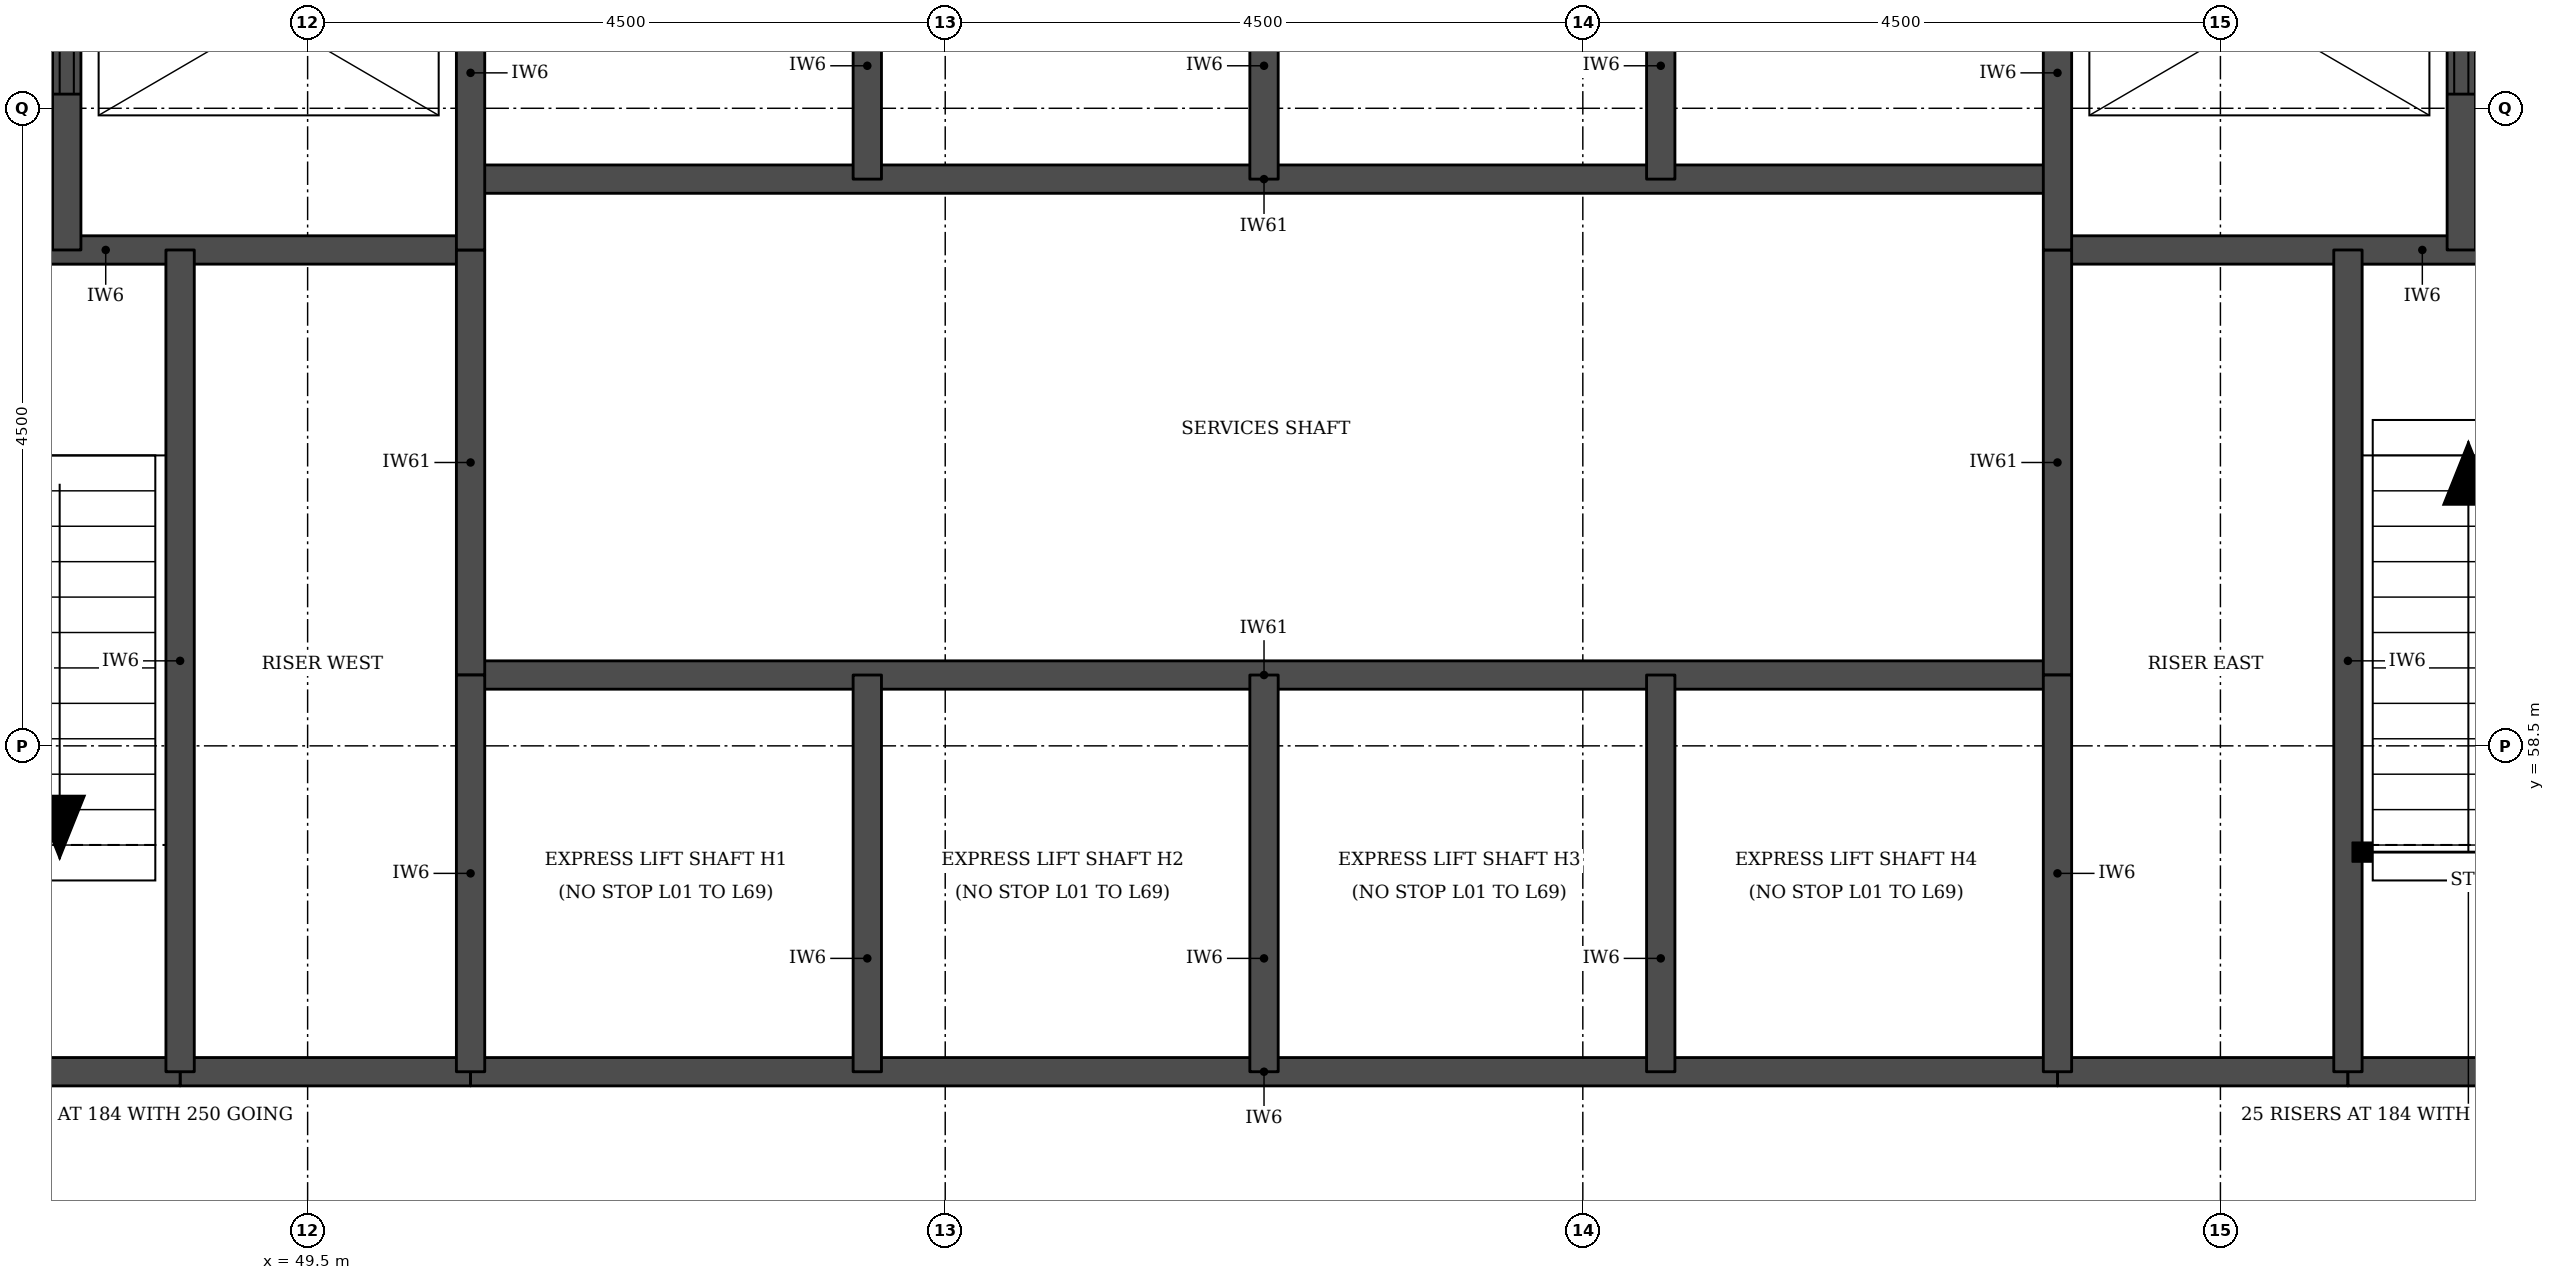
"""IFC4 building model, lengths in metres.
Left out: names, types, materials, properties, quantities, classifications, styles, units other than length and angle.
Written with IfcOpenShell. Run it as: python <this file> out.ifc"""

import sys

from ifc_helpers import new_model, si_unit, direction, frame, frame_2d, origin, place, context, subcontext, project, spatial, rectangle, extrude, element, fill, save


model = new_model("IFC4")
c1 = context("Model", 3, precision=1e-05, world=origin(), true_north=direction((0.0, 1.0)))
c2 = subcontext(c1, "Body", "Model", "MODEL_VIEW")
j1 = project(units=[si_unit("LENGTHUNIT", "METRE"), si_unit("PLANEANGLEUNIT", "RADIAN")], contexts=[c1])
p1 = place(None, origin())
s1 = spatial("IfcSite", under=j1, at=p1, CompositionType="ELEMENT")
p2 = place(p1, origin())
s2 = spatial("IfcBuilding", under=s1, at=p2, CompositionType="ELEMENT")
p3 = place(p2, frame((0.0, 0.0, 18.5)))
s3 = spatial("IfcBuildingStorey", under=s2, at=p3, CompositionType="ELEMENT", Elevation=18.5)
for number, where, z_axis, x_axis in (
    (1, (48.6, 56.2, 0.0), (0.0, 0.0, 1.0), (1.0, 0.0, 0.0)),
    (2, (61.85, 56.2, 0.0), (0.0, 0.0, 1.0), (1.0, 0.0, 0.0)),
):
    element("IfcWall", number, at=place(p3, frame(where, z_axis=z_axis, x_axis=x_axis)), inside=s3, PredefinedType="SOLIDWALL", context=c2, shape_type="SweptSolid", body=[
        extrude(rectangle(XDim=2.05, YDim=0.2, at=frame_2d((1.025, 0.0))), origin(), (0.0, 0.0, 1.0), 4.38),
    ])
p4 = place(p3, frame((45.5, 56.2, 0.0), z_axis=(0.0, 0.0, 1.0), x_axis=(1.0, 0.0, 0.0)))
e3 = element("IfcWall", 3, at=p4, inside=s3, PredefinedType="SOLIDWALL", context=c2, shape_type="SweptSolid", body=[
    extrude(rectangle(XDim=3.1, YDim=0.2, at=frame_2d((1.55, 0.0))), origin(), (0.0, 0.0, 1.0), 4.38),
])
p5 = place(p3, frame((50.65, 56.2, 0.0), z_axis=(0.0, 0.0, 1.0), x_axis=(1.0, 0.0, 0.0)))
e4 = element("IfcWall", 4, at=p5, inside=s3, PredefinedType="SOLIDWALL", context=c2, shape_type="SweptSolid", body=[
    extrude(rectangle(XDim=11.2, YDim=0.2, at=frame_2d((5.6, 0.0))), origin(), (0.0, 0.0, 1.0), 4.38),
])
p6 = place(p3, frame((63.9, 56.2, 0.0), z_axis=(0.0, 0.0, 1.0), x_axis=(1.0, 0.0, 0.0)))
e5 = element("IfcWall", 5, at=p6, inside=s3, PredefinedType="SOLIDWALL", context=c2, shape_type="SweptSolid", body=[
    extrude(rectangle(XDim=3.1, YDim=0.2, at=frame_2d((1.55, 0.0))), origin(), (0.0, 0.0, 1.0), 4.38),
])
p7 = place(p3, frame((50.65, 59.0, 0.0), z_axis=(0.0, 0.0, 1.0), x_axis=(1.0, 0.0, 0.0)))
e6 = element("IfcWall", 6, at=p7, inside=s3, PredefinedType="SOLIDWALL", context=c2, shape_type="SweptSolid", body=[
    extrude(rectangle(XDim=11.2, YDim=0.2, at=frame_2d((5.6, 0.0))), origin(), (0.0, 0.0, 1.0), 4.6),
])
for number, where, z_axis, x_axis in (
    (7, (45.5, 62.0, 0.0), (0.0, 0.0, 1.0), (1.0, 0.0, 0.0)),
    (8, (61.85, 62.0, 0.0), (0.0, 0.0, 1.0), (1.0, 0.0, 0.0)),
):
    element("IfcWall", number, at=place(p3, frame(where, z_axis=z_axis, x_axis=x_axis)), inside=s3, PredefinedType="SOLIDWALL", context=c2, shape_type="SweptSolid", body=[
        extrude(rectangle(XDim=5.15, YDim=0.2, at=frame_2d((2.575, 0.0))), origin(), (0.0, 0.0, 1.0), 4.38),
    ])
p8 = place(p3, frame((50.65, 62.5, 0.0), z_axis=(0.0, 0.0, 1.0), x_axis=(1.0, 0.0, 0.0)))
e9 = element("IfcWall", 9, at=p8, inside=s3, PredefinedType="SOLIDWALL", context=c2, shape_type="SweptSolid", body=[
    extrude(rectangle(XDim=11.2, YDim=0.2, at=frame_2d((5.6, 0.0))), origin(), (0.0, 0.0, 1.0), 4.6),
])
p9 = place(p3, frame((47.8, 62.0, 0.0), z_axis=(0.0, 0.0, 1.0), x_axis=(0.0, 1.0, 0.0)))
e10 = element("IfcWall", 10, at=p9, inside=s3, PredefinedType="SOLIDWALL", context=c2, shape_type="SweptSolid", body=[
    extrude(rectangle(XDim=3.3, YDim=0.2, at=frame_2d((1.65, 0.0))), origin(), (0.0, 0.0, 1.0), 4.38),
])
p10 = place(p9, frame((1.1, 0.0, 0.0)))
e11 = element("IfcOpeningElement", 11, at=p10, cuts=e10, PredefinedType="OPENING", context=c2, shape_type="SweptSolid", body=[
    extrude(rectangle(XDim=1.1, YDim=2.1, at=frame_2d((0.55, 1.05))), frame((0.0, 0.11, 0.0), z_axis=(0.0, -1.0, 0.0), x_axis=(1.0, 0.0, 0.0)), (0.0, 0.0, 1.0), 0.22),
])
p11 = place(p3, frame((48.6, 56.2, 0.0), z_axis=(0.0, 0.0, 1.0), x_axis=(0.0, 1.0, 0.0)))
e12 = element("IfcWall", 12, at=p11, inside=s3, PredefinedType="SOLIDWALL", context=c2, shape_type="SweptSolid", body=[
    extrude(rectangle(XDim=5.8, YDim=0.2, at=frame_2d((2.9, 0.0))), origin(), (0.0, 0.0, 1.0), 4.38),
])
p12 = place(p3, frame((50.65, 59.0, 0.0), z_axis=(0.0, 0.0, 1.0), x_axis=(0.0, 1.0, 0.0)))
e13 = element("IfcWall", 13, at=p12, inside=s3, PredefinedType="SOLIDWALL", context=c2, shape_type="SweptSolid", body=[
    extrude(rectangle(XDim=3.0, YDim=0.2, at=frame_2d((1.5, 0.0))), origin(), (0.0, 0.0, 1.0), 4.6),
])
p13 = place(p3, frame((50.65, 56.2, 0.0), z_axis=(0.0, 0.0, 1.0), x_axis=(0.0, 1.0, 0.0)))
e14 = element("IfcWall", 14, at=p13, inside=s3, PredefinedType="SOLIDWALL", context=c2, shape_type="SweptSolid", body=[
    extrude(rectangle(XDim=2.8, YDim=0.2, at=frame_2d((1.4, 0.0))), origin(), (0.0, 0.0, 1.0), 4.38),
])
p14 = place(p3, frame((50.65, 62.0, 0.0), z_axis=(0.0, 0.0, 1.0), x_axis=(0.0, 1.0, 0.0)))
e15 = element("IfcWall", 15, at=p14, inside=s3, PredefinedType="SOLIDWALL", context=c2, shape_type="SweptSolid", body=[
    extrude(rectangle(XDim=3.3, YDim=0.2, at=frame_2d((1.65, 0.0))), origin(), (0.0, 0.0, 1.0), 4.38),
])
for number, where, z_axis, x_axis in (
    (16, (53.45, 56.2, 0.0), (0.0, 0.0, 1.0), (0.0, 1.0, 0.0)),
    (17, (53.45, 62.5, 0.0), (0.0, 0.0, 1.0), (0.0, 1.0, 0.0)),
    (18, (56.25, 56.2, 0.0), (0.0, 0.0, 1.0), (0.0, 1.0, 0.0)),
    (19, (56.25, 62.5, 0.0), (0.0, 0.0, 1.0), (0.0, 1.0, 0.0)),
    (20, (59.05, 56.2, 0.0), (0.0, 0.0, 1.0), (0.0, 1.0, 0.0)),
    (21, (59.05, 62.5, 0.0), (0.0, 0.0, 1.0), (0.0, 1.0, 0.0)),
):
    element("IfcWall", number, at=place(p3, frame(where, z_axis=z_axis, x_axis=x_axis)), inside=s3, PredefinedType="SOLIDWALL", context=c2, shape_type="SweptSolid", body=[
        extrude(rectangle(XDim=2.8, YDim=0.2, at=frame_2d((1.4, 0.0))), origin(), (0.0, 0.0, 1.0), 4.38),
    ])
p15 = place(p3, frame((61.85, 59.0, 0.0), z_axis=(0.0, 0.0, 1.0), x_axis=(0.0, 1.0, 0.0)))
e22 = element("IfcWall", 22, at=p15, inside=s3, PredefinedType="SOLIDWALL", context=c2, shape_type="SweptSolid", body=[
    extrude(rectangle(XDim=3.0, YDim=0.2, at=frame_2d((1.5, 0.0))), origin(), (0.0, 0.0, 1.0), 4.6),
])
p16 = place(p3, frame((61.85, 56.2, 0.0), z_axis=(0.0, 0.0, 1.0), x_axis=(0.0, 1.0, 0.0)))
e23 = element("IfcWall", 23, at=p16, inside=s3, PredefinedType="SOLIDWALL", context=c2, shape_type="SweptSolid", body=[
    extrude(rectangle(XDim=2.8, YDim=0.2, at=frame_2d((1.4, 0.0))), origin(), (0.0, 0.0, 1.0), 4.38),
])
p17 = place(p3, frame((61.85, 62.0, 0.0), z_axis=(0.0, 0.0, 1.0), x_axis=(0.0, 1.0, 0.0)))
e24 = element("IfcWall", 24, at=p17, inside=s3, PredefinedType="SOLIDWALL", context=c2, shape_type="SweptSolid", body=[
    extrude(rectangle(XDim=3.3, YDim=0.2, at=frame_2d((1.65, 0.0))), origin(), (0.0, 0.0, 1.0), 4.38),
])
p18 = place(p3, frame((63.9, 56.2, 0.0), z_axis=(0.0, 0.0, 1.0), x_axis=(0.0, 1.0, 0.0)))
e25 = element("IfcWall", 25, at=p18, inside=s3, PredefinedType="SOLIDWALL", context=c2, shape_type="SweptSolid", body=[
    extrude(rectangle(XDim=5.8, YDim=0.2, at=frame_2d((2.9, 0.0))), origin(), (0.0, 0.0, 1.0), 4.38),
])
p19 = place(p3, frame((64.7, 62.0, 0.0), z_axis=(0.0, 0.0, 1.0), x_axis=(0.0, 1.0, 0.0)))
e26 = element("IfcWall", 26, at=p19, inside=s3, PredefinedType="SOLIDWALL", context=c2, shape_type="SweptSolid", body=[
    extrude(rectangle(XDim=3.3, YDim=0.2, at=frame_2d((1.65, 0.0))), origin(), (0.0, 0.0, 1.0), 4.38),
])
p20 = place(p19, frame((1.1, 0.0, 0.0)))
e27 = element("IfcOpeningElement", 27, at=p20, cuts=e26, PredefinedType="OPENING", context=c2, shape_type="SweptSolid", body=[
    extrude(rectangle(XDim=1.1, YDim=2.1, at=frame_2d((0.55, 1.05))), frame((0.0, 0.11, 0.0), z_axis=(0.0, -1.0, 0.0), x_axis=(1.0, 0.0, 0.0)), (0.0, 0.0, 1.0), 0.22),
])
p21 = place(p10, origin())
e28 = element("IfcDoor", 28, at=p21, inside=s3, OperationType="DOUBLE_DOOR_SLIDING", PredefinedType="DOOR", context=c2, shape_type="SweptSolid", body=[
    extrude(rectangle(XDim=1.1, YDim=2.1, at=frame_2d((0.55, 1.05))), frame((0.0, 0.025, 0.0), z_axis=(0.0, -1.0, 0.0), x_axis=(1.0, 0.0, 0.0)), (0.0, 0.0, 1.0), 0.05),
])
fill(e11, e28)
p22 = place(p20, origin())
e29 = element("IfcDoor", 29, at=p22, inside=s3, OperationType="DOUBLE_DOOR_SLIDING", PredefinedType="DOOR", context=c2, shape_type="SweptSolid", body=[
    extrude(rectangle(XDim=1.1, YDim=2.1, at=frame_2d((0.55, 1.05))), frame((0.0, 0.025, 0.0), z_axis=(0.0, -1.0, 0.0), x_axis=(1.0, 0.0, 0.0)), (0.0, 0.0, 1.0), 0.05),
])
fill(e27, e29)
save(model, sys.argv[1])
